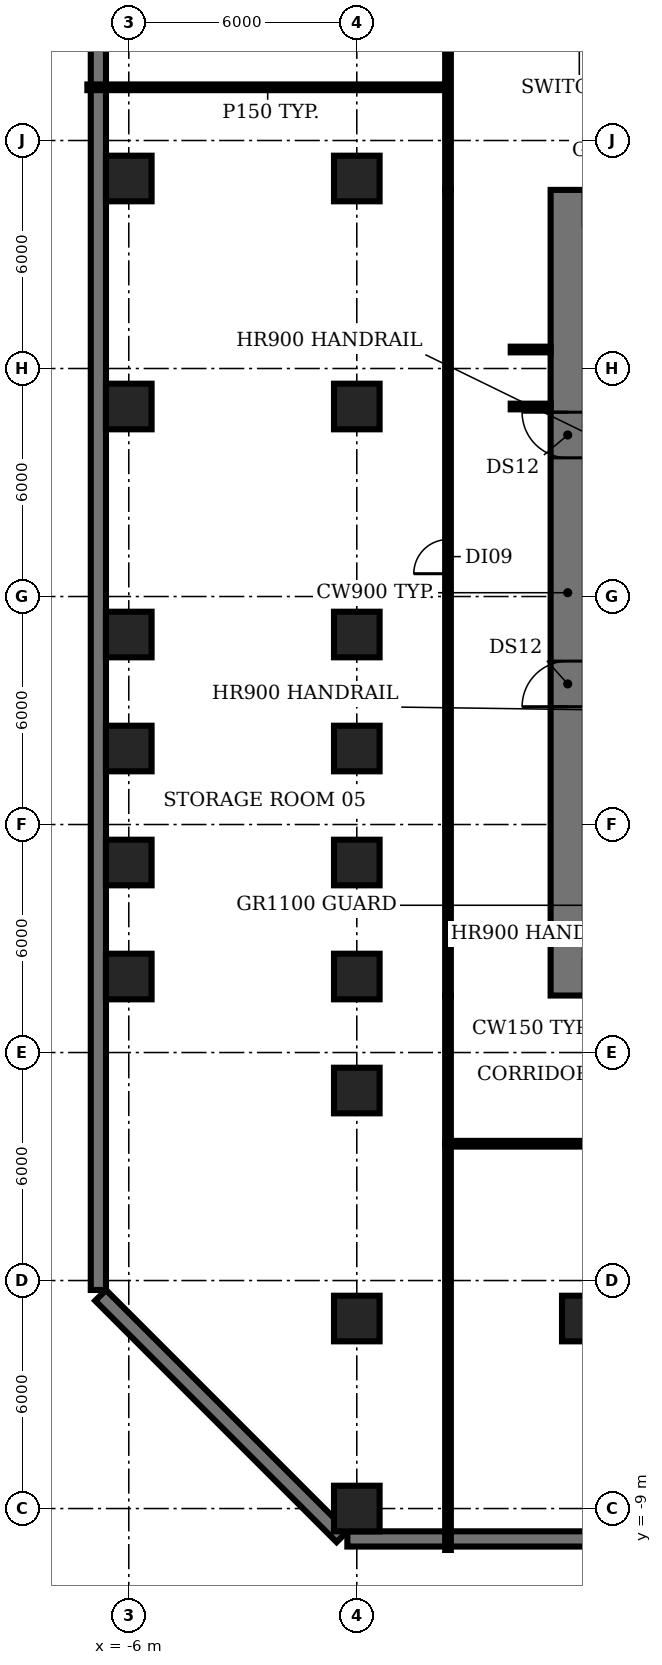
"""IFC4 building model, lengths in metres.
Left out: names, types, materials, properties, quantities, classifications, styles, units other than length and angle.
Written with IfcOpenShell. Run it as: python <this file> out.ifc"""

import sys

from ifc_helpers import new_model, si_unit, direction, frame, frame_2d, origin, origin_2d, place, context, subcontext, project, spatial, rectangle, extrude, element, fill, save


model = new_model("IFC4")
c1 = context("Model", 3, precision=1e-05, world=origin(), true_north=direction((0.0, 1.0)))
c2 = subcontext(c1, "Body", "Model", "MODEL_VIEW")
j1 = project(units=[si_unit("LENGTHUNIT", "METRE"), si_unit("PLANEANGLEUNIT", "RADIAN")], contexts=[c1])
p1 = place(None, origin())
s1 = spatial("IfcSite", under=j1, at=p1, CompositionType="ELEMENT")
p2 = place(p1, origin())
s2 = spatial("IfcBuilding", under=s1, at=p2, CompositionType="ELEMENT")
p3 = place(p2, frame((0.0, 0.0, -6.0)))
s3 = spatial("IfcBuildingStorey", under=s2, at=p3, CompositionType="ELEMENT", Elevation=-6.0)
for number, where, z_axis, x_axis in (
    (1, (-6.0, 5.0, -0.3), (0.0, 0.0, 1.0), (1.0, 0.0, 0.0)),
    (2, (-6.0, 8.0, -0.3), (0.0, 0.0, 1.0), (1.0, 0.0, 0.0)),
    (3, (-6.0, 11.0, -0.3), (0.0, 0.0, 1.0), (1.0, 0.0, 0.0)),
    (4, (-6.0, 14.0, -0.3), (0.0, 0.0, 1.0), (1.0, 0.0, 0.0)),
    (5, (-6.0, 20.0, -0.3), (0.0, 0.0, 1.0), (1.0, 0.0, 0.0)),
    (6, (-6.0, 26.0, -0.3), (0.0, 0.0, 1.0), (1.0, 0.0, 0.0)),
    (7, (0.0, -9.0, -0.3), (0.0, 0.0, 1.0), (1.0, 0.0, 0.0)),
    (8, (0.0, -4.0, -0.3), (0.0, 0.0, 1.0), (1.0, 0.0, 0.0)),
    (9, (0.0, 2.0, -0.3), (0.0, 0.0, 1.0), (1.0, 0.0, 0.0)),
    (10, (0.0, 5.0, -0.3), (0.0, 0.0, 1.0), (1.0, 0.0, 0.0)),
    (11, (0.0, 8.0, -0.3), (0.0, 0.0, 1.0), (1.0, 0.0, 0.0)),
    (12, (0.0, 11.0, -0.3), (0.0, 0.0, 1.0), (1.0, 0.0, 0.0)),
    (13, (0.0, 14.0, -0.3), (0.0, 0.0, 1.0), (1.0, 0.0, 0.0)),
    (14, (0.0, 20.0, -0.3), (0.0, 0.0, 1.0), (1.0, 0.0, 0.0)),
    (15, (0.0, 26.0, -0.3), (0.0, 0.0, 1.0), (1.0, 0.0, 0.0)),
    (16, (6.0, -4.0, -0.3), (0.0, 0.0, 1.0), (1.0, 0.0, 0.0)),
):
    element("IfcColumn", number, at=place(p3, frame(where, z_axis=z_axis, x_axis=x_axis)), inside=s3, PredefinedType="COLUMN", context=c2, shape_type="SweptSolid", body=[
        extrude(rectangle(XDim=1.2, YDim=1.2, at=origin_2d()), origin(), (0.0, 0.0, 1.0), 5.95),
    ])
p4 = place(p3, frame((-0.249, -9.8, 0.0), z_axis=(0.0, 0.0, 1.0), x_axis=(1.0, 0.0, 0.0)))
e17 = element("IfcWall", 17, at=p4, inside=s3, PredefinedType="SOLIDWALL", context=c2, shape_type="SweptSolid", body=[
    extrude(rectangle(XDim=90.497, YDim=0.4, at=frame_2d((45.249, 0.0))), origin(), (0.0, 0.0, 1.0), 5.65),
])
p5 = place(p3, frame((-6.8, 63.249, 0.0), z_axis=(0.0, 0.0, 1.0), x_axis=(0.0, -1.0, 0.0)))
e18 = element("IfcWall", 18, at=p5, inside=s3, PredefinedType="SOLIDWALL", context=c2, shape_type="SweptSolid", body=[
    extrude(rectangle(XDim=66.497, YDim=0.4, at=frame_2d((33.249, 0.0))), origin(), (0.0, 0.0, 1.0), 5.65),
])
p6 = place(p3, frame((-6.741, -3.39, 0.0), z_axis=(0.0, 0.0, 1.0), x_axis=(0.707106781187, -0.707106781187, 0.0)))
e19 = element("IfcWall", 19, at=p6, inside=s3, PredefinedType="SOLIDWALL", context=c2, shape_type="SweptSolid", body=[
    extrude(rectangle(XDim=8.982, YDim=0.4, at=frame_2d((4.491, 0.0))), origin(), (0.0, 0.0, 1.0), 5.65),
])
p7 = place(p3, frame((5.55, 4.5, 0.0), z_axis=(0.0, 0.0, 1.0), x_axis=(0.0, 1.0, 0.0)))
e20 = element("IfcWall", 20, at=p7, inside=s3, PredefinedType="SHEAR", context=c2, shape_type="SweptSolid", body=[
    extrude(rectangle(XDim=21.2, YDim=0.9, at=frame_2d((10.6, 0.0))), origin(), (0.0, 0.0, 1.0), 5.65),
])
p8 = place(p7, frame((7.6, 0.0, 0.0)))
e21 = element("IfcOpeningElement", 21, at=p8, cuts=e20, PredefinedType="OPENING", context=c2, shape_type="SweptSolid", body=[
    extrude(rectangle(XDim=1.2, YDim=2.1, at=frame_2d((0.6, 1.05))), frame((0.0, 0.46, 0.0), z_axis=(0.0, -1.0, 0.0), x_axis=(1.0, 0.0, 0.0)), (0.0, 0.0, 1.0), 0.92),
])
p9 = place(p7, frame((14.15, 0.0, 0.0)))
e22 = element("IfcOpeningElement", 22, at=p9, cuts=e20, PredefinedType="OPENING", context=c2, shape_type="SweptSolid", body=[
    extrude(rectangle(XDim=1.2, YDim=2.1, at=frame_2d((0.6, 1.05))), frame((0.0, 0.46, 0.0), z_axis=(0.0, -1.0, 0.0), x_axis=(1.0, 0.0, 0.0)), (0.0, 0.0, 1.0), 0.92),
])
p10 = place(p3, frame((-7.09, 28.4, 0.0), z_axis=(0.0, 0.0, 1.0), x_axis=(1.0, 0.0, 0.0)))
e23 = element("IfcWall", 23, at=p10, inside=s3, PredefinedType="PARTITIONING", context=c2, shape_type="SweptSolid", body=[
    extrude(rectangle(XDim=9.49, YDim=0.15, at=frame_2d((4.745, 0.0))), origin(), (0.0, 0.0, 1.0), 4.7),
])
p11 = place(p3, frame((2.4, -10.09, 0.0), z_axis=(0.0, 0.0, 1.0), x_axis=(0.0, 1.0, 0.0)))
e24 = element("IfcWall", 24, at=p11, inside=s3, PredefinedType="PARTITIONING", context=c2, shape_type="SweptSolid", body=[
    extrude(rectangle(XDim=10.69, YDim=0.15, at=frame_2d((5.345, 0.0))), origin(), (0.0, 0.0, 1.0), 4.7),
])
p12 = place(p3, frame((2.4, 0.6, 0.0), z_axis=(0.0, 0.0, 1.0), x_axis=(0.0, 1.0, 0.0)))
e25 = element("IfcWall", 25, at=p12, inside=s3, PredefinedType="PARTITIONING", context=c2, shape_type="SweptSolid", body=[
    extrude(rectangle(XDim=3.9, YDim=0.15, at=frame_2d((1.95, 0.0))), origin(), (0.0, 0.0, 1.0), 4.7),
])
p13 = place(p3, frame((2.4, 4.5, 0.0), z_axis=(0.0, 0.0, 1.0), x_axis=(0.0, 1.0, 0.0)))
e26 = element("IfcWall", 26, at=p13, inside=s3, PredefinedType="PARTITIONING", context=c2, shape_type="SweptSolid", body=[
    extrude(rectangle(XDim=21.2, YDim=0.15, at=frame_2d((10.6, 0.0))), origin(), (0.0, 0.0, 1.0), 4.7),
])
p14 = place(p13, frame((11.1, 0.0, 0.0)))
e27 = element("IfcOpeningElement", 27, at=p14, cuts=e26, PredefinedType="OPENING", context=c2, shape_type="SweptSolid", body=[
    extrude(rectangle(XDim=0.9, YDim=2.1, at=frame_2d((0.45, 1.05))), frame((0.0, 0.085, 0.0), z_axis=(0.0, -1.0, 0.0), x_axis=(1.0, 0.0, 0.0)), (0.0, 0.0, 1.0), 0.17),
])
p15 = place(p3, frame((2.4, 25.7, 0.0), z_axis=(0.0, 0.0, 1.0), x_axis=(0.0, 1.0, 0.0)))
e28 = element("IfcWall", 28, at=p15, inside=s3, PredefinedType="PARTITIONING", context=c2, shape_type="SweptSolid", body=[
    extrude(rectangle(XDim=3.9, YDim=0.15, at=frame_2d((1.95, 0.0))), origin(), (0.0, 0.0, 1.0), 4.7),
])
for number, where, z_axis, x_axis in (
    (29, (4.05, 20.0, 0.0), (0.0, 0.0, 1.0), (1.0, 0.0, 0.0)),
    (30, (4.05, 21.5, 0.0), (0.0, 0.0, 1.0), (1.0, 0.0, 0.0)),
):
    element("IfcWall", number, at=place(p3, frame(where, z_axis=z_axis, x_axis=x_axis)), inside=s3, PredefinedType="PARTITIONING", context=c2, shape_type="SweptSolid", body=[
        extrude(rectangle(XDim=1.05, YDim=0.15, at=frame_2d((0.525, 0.0))), origin(), (0.0, 0.0, 1.0), 4.7),
    ])
p16 = place(p3, frame((27.6, 0.6, 0.0), z_axis=(0.0, 0.0, 1.0), x_axis=(-1.0, 0.0, 0.0)))
e31 = element("IfcWall", 31, at=p16, inside=s3, PredefinedType="PARTITIONING", context=c2, shape_type="SweptSolid", body=[
    extrude(rectangle(XDim=25.2, YDim=0.15, at=frame_2d((12.6, 0.0))), origin(), (0.0, 0.0, 1.0), 4.7),
])
p17 = place(p16, frame((12.1, 0.0, 0.0)))
e32 = element("IfcOpeningElement", 32, at=p17, cuts=e31, PredefinedType="OPENING", context=c2, shape_type="SweptSolid", body=[
    extrude(rectangle(XDim=0.9, YDim=2.1, at=frame_2d((0.45, 1.05))), frame((0.0, 0.085, 0.0), z_axis=(0.0, -1.0, 0.0), x_axis=(1.0, 0.0, 0.0)), (0.0, 0.0, 1.0), 0.17),
])
p18 = place(p8, origin())
e33 = element("IfcDoor", 33, at=p18, inside=s3, OperationType="SINGLE_SWING_LEFT", PredefinedType="DOOR", context=c2, shape_type="SweptSolid", body=[
    extrude(rectangle(XDim=1.2, YDim=2.1, at=frame_2d((0.6, 1.05))), frame((0.0, 0.025, 0.0), z_axis=(0.0, -1.0, 0.0), x_axis=(1.0, 0.0, 0.0)), (0.0, 0.0, 1.0), 0.05),
])
fill(e21, e33)
p19 = place(p9, origin())
e34 = element("IfcDoor", 34, at=p19, inside=s3, OperationType="SINGLE_SWING_RIGHT", PredefinedType="DOOR", context=c2, shape_type="SweptSolid", body=[
    extrude(rectangle(XDim=1.2, YDim=2.1, at=frame_2d((0.6, 1.05))), frame((0.0, 0.025, 0.0), z_axis=(0.0, -1.0, 0.0), x_axis=(1.0, 0.0, 0.0)), (0.0, 0.0, 1.0), 0.05),
])
fill(e22, e34)
p20 = place(p14, origin())
e35 = element("IfcDoor", 35, at=p20, inside=s3, OperationType="SINGLE_SWING_LEFT", PredefinedType="DOOR", context=c2, shape_type="SweptSolid", body=[
    extrude(rectangle(XDim=0.9, YDim=2.1, at=frame_2d((0.45, 1.05))), frame((0.0, 0.025, 0.0), z_axis=(0.0, -1.0, 0.0), x_axis=(1.0, 0.0, 0.0)), (0.0, 0.0, 1.0), 0.05),
])
fill(e27, e35)
save(model, sys.argv[1])
